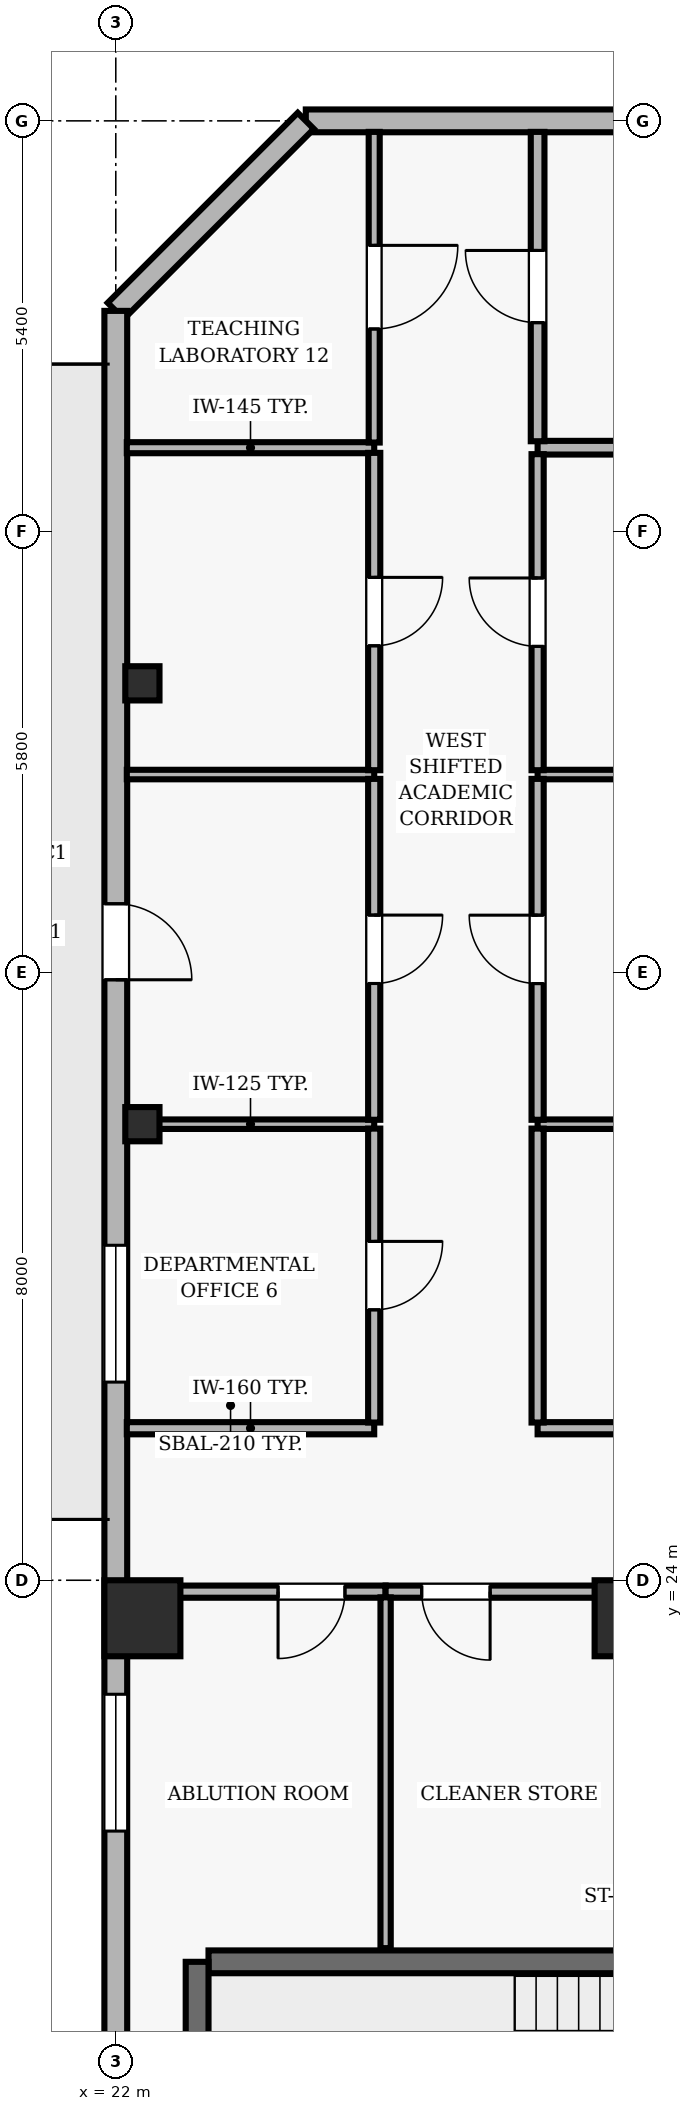
"""IFC4 building model, lengths in metres.
Left out: names, types, materials, properties, quantities, classifications, styles, units other than length and angle.
Written with IfcOpenShell. Run it as: python <this file> out.ifc"""

import sys

from ifc_helpers import new_model, si_unit, direction, frame, frame_2d, origin, origin_2d, place, context, subcontext, project, spatial, rectangle, hollow_rectangle, extrude, element, fill, save


model = new_model("IFC4")
c1 = context("Model", 3, precision=1e-05, world=origin(), true_north=direction((0.0, 1.0)))
c2 = subcontext(c1, "Body", "Model", "MODEL_VIEW")
j1 = project(units=[si_unit("LENGTHUNIT", "METRE"), si_unit("PLANEANGLEUNIT", "RADIAN")], contexts=[c1])
p1 = place(None, origin())
s1 = spatial("IfcSite", under=j1, at=p1, CompositionType="ELEMENT")
p2 = place(p1, origin())
s2 = spatial("IfcBuilding", under=s1, at=p2, CompositionType="ELEMENT")
p3 = place(p2, frame((0.0, 0.0, 187.5)))
s3 = spatial("IfcBuildingStorey", under=s2, at=p3, CompositionType="ELEMENT", Elevation=187.5)
for number, where, z_axis, x_axis in (
    (1, (22.35, 23.5, 0.0), (0.0, 0.0, 1.0), (1.0, 0.0, 0.0)),
    (2, (28.8, 23.5, 0.0), (0.0, 0.0, 1.0), (1.0, 0.0, 0.0)),
):
    element("IfcColumn", number, at=place(p3, frame(where, z_axis=z_axis, x_axis=x_axis)), inside=s3, PredefinedType="COLUMN", context=c2, shape_type="SweptSolid", body=[
        extrude(rectangle(XDim=1.0, YDim=1.0, at=origin_2d()), origin(), (0.0, 0.0, 1.0), 3.9),
    ])
for number, where, z_axis, x_axis in (
    (3, (22.35, 30.0, 0.0), (0.0, 0.0, 1.0), (1.0, 0.0, 0.0)),
    (4, (22.35, 35.8, 0.0), (0.0, 0.0, 1.0), (1.0, 0.0, 0.0)),
):
    element("IfcColumn", number, at=place(p3, frame(where, z_axis=z_axis, x_axis=x_axis)), inside=s3, PredefinedType="COLUMN", context=c2, shape_type="SweptSolid", body=[
        extrude(hollow_rectangle(XDim=0.45, YDim=0.45, WallThickness=0.02, at=origin_2d()), origin(), (0.0, 0.0, 1.0), 3.9),
    ])
p4 = place(p3, frame((35.5, 43.2, 0.0), z_axis=(0.0, 0.0, 1.0), x_axis=(-1.0, 0.0, 0.0)))
e5 = element("IfcWall", 5, at=p4, inside=s3, PredefinedType="SOLIDWALL", context=c2, shape_type="SweptSolid", body=[
    extrude(rectangle(XDim=11.0, YDim=0.3, at=frame_2d((5.5, 0.0))), origin(), (0.0, 0.0, 1.0), 3.69),
])
p5 = place(p4, frame((1.55, 0.0, 0.9)))
e6 = element("IfcOpeningElement", 6, at=p5, cuts=e5, PredefinedType="OPENING", context=c2, shape_type="SweptSolid", body=[
    extrude(rectangle(XDim=2.4, YDim=1.8, at=frame_2d((1.2, 0.9))), frame((0.0, 0.16, 0.0), z_axis=(0.0, -1.0, 0.0), x_axis=(1.0, 0.0, 0.0)), (0.0, 0.0, 1.0), 0.32),
])
p6 = place(p3, frame((24.5, 43.2, 0.0), z_axis=(0.0, 0.0, 1.0), x_axis=(-0.707106781187, -0.707106781187, 0.0)))
e7 = element("IfcWall", 7, at=p6, inside=s3, PredefinedType="SOLIDWALL", context=c2, shape_type="SweptSolid", body=[
    extrude(rectangle(XDim=3.536, YDim=0.3, at=frame_2d((1.768, 0.0))), origin(), (0.0, 0.0, 1.0), 3.69),
])
p7 = place(p3, frame((22.0, 40.7, 0.0), z_axis=(0.0, 0.0, 1.0), x_axis=(0.0, -1.0, 0.0)))
e8 = element("IfcWall", 8, at=p7, inside=s3, PredefinedType="SOLIDWALL", context=c2, shape_type="SweptSolid", body=[
    extrude(rectangle(XDim=38.2, YDim=0.3, at=frame_2d((19.1, 0.0))), origin(), (0.0, 0.0, 1.0), 3.69),
])
p8 = place(p7, frame((7.8, 0.0, 0.0)))
e9 = element("IfcOpeningElement", 9, at=p8, cuts=e8, PredefinedType="OPENING", context=c2, shape_type="SweptSolid", body=[
    extrude(rectangle(XDim=1.0, YDim=2.2, at=frame_2d((0.5, 1.1))), frame((0.0, 0.16, 0.0), z_axis=(0.0, -1.0, 0.0), x_axis=(1.0, 0.0, 0.0)), (0.0, 0.0, 1.0), 0.32),
])
p9 = place(p7, frame((12.293, 0.0, 0.9)))
e10 = element("IfcOpeningElement", 10, at=p9, cuts=e8, PredefinedType="OPENING", context=c2, shape_type="SweptSolid", body=[
    extrude(rectangle(XDim=1.8, YDim=2.2, at=frame_2d((0.9, 1.1))), frame((0.0, 0.16, 0.0), z_axis=(0.0, -1.0, 0.0), x_axis=(1.0, 0.0, 0.0)), (0.0, 0.0, 1.0), 0.32),
])
p10 = place(p7, frame((18.2, 0.0, 0.9)))
e11 = element("IfcOpeningElement", 11, at=p10, cuts=e8, PredefinedType="OPENING", context=c2, shape_type="SweptSolid", body=[
    extrude(rectangle(XDim=1.8, YDim=2.2, at=frame_2d((0.9, 1.1))), frame((0.0, 0.16, 0.0), z_axis=(0.0, -1.0, 0.0), x_axis=(1.0, 0.0, 0.0)), (0.0, 0.0, 1.0), 0.32),
])
p11 = place(p7, frame((23.207, 0.0, 0.9)))
e12 = element("IfcOpeningElement", 12, at=p11, cuts=e8, PredefinedType="OPENING", context=c2, shape_type="SweptSolid", body=[
    extrude(rectangle(XDim=1.8, YDim=2.2, at=frame_2d((0.9, 1.1))), frame((0.0, 0.16, 0.0), z_axis=(0.0, -1.0, 0.0), x_axis=(1.0, 0.0, 0.0)), (0.0, 0.0, 1.0), 0.32),
])
p12 = place(p7, frame((29.114, 0.0, 0.9)))
e13 = element("IfcOpeningElement", 13, at=p12, cuts=e8, PredefinedType="OPENING", context=c2, shape_type="SweptSolid", body=[
    extrude(rectangle(XDim=1.8, YDim=2.2, at=frame_2d((0.9, 1.1))), frame((0.0, 0.16, 0.0), z_axis=(0.0, -1.0, 0.0), x_axis=(1.0, 0.0, 0.0)), (0.0, 0.0, 1.0), 0.32),
])
p13 = place(p3, frame((31.58, 18.98, 0.0), z_axis=(0.0, 0.0, 1.0), x_axis=(-1.0, 0.0, 0.0)))
e14 = element("IfcWall", 14, at=p13, inside=s3, PredefinedType="SHEAR", context=c2, shape_type="SweptSolid", body=[
    extrude(rectangle(XDim=8.36, YDim=0.3, at=frame_2d((4.18, 0.0))), origin(), (0.0, 0.0, 1.0), 3.69),
])
p14 = place(p3, frame((23.07, 18.98, 0.0), z_axis=(0.0, 0.0, 1.0), x_axis=(0.0, -1.0, 0.0)))
e15 = element("IfcWall", 15, at=p14, inside=s3, PredefinedType="SHEAR", context=c2, shape_type="SweptSolid", body=[
    extrude(rectangle(XDim=3.51, YDim=0.3, at=frame_2d((1.755, 0.0))), origin(), (0.0, 0.0, 1.0), 3.69),
])
p15 = place(p3, frame((25.4, 26.0, 0.0), z_axis=(0.0, 0.0, 1.0), x_axis=(-1.0, 0.0, 0.0)))
e16 = element("IfcWall", 16, at=p15, inside=s3, PredefinedType="PARTITIONING", context=c2, shape_type="SweptSolid", body=[
    extrude(rectangle(XDim=3.255, YDim=0.16, at=frame_2d((1.627, 0.0))), origin(), (0.0, 0.0, 1.0), 3.69),
])
p16 = place(p3, frame((25.4, 30.0, 0.0), z_axis=(0.0, 0.0, 1.0), x_axis=(-1.0, 0.0, 0.0)))
e17 = element("IfcWall", 17, at=p16, inside=s3, PredefinedType="PARTITIONING", context=c2, shape_type="SweptSolid", body=[
    extrude(rectangle(XDim=3.255, YDim=0.125, at=frame_2d((1.627, 0.0))), origin(), (0.0, 0.0, 1.0), 3.146),
])
p17 = place(p3, frame((25.4, 34.6, 0.0), z_axis=(0.0, 0.0, 1.0), x_axis=(-1.0, 0.0, 0.0)))
e18 = element("IfcWall", 18, at=p17, inside=s3, PredefinedType="PARTITIONING", context=c2, shape_type="SweptSolid", body=[
    extrude(rectangle(XDim=3.255, YDim=0.125, at=frame_2d((1.627, 0.0))), origin(), (0.0, 0.0, 1.0), 3.69),
])
p18 = place(p3, frame((25.4, 38.9, 0.0), z_axis=(0.0, 0.0, 1.0), x_axis=(-1.0, 0.0, 0.0)))
e19 = element("IfcWall", 19, at=p18, inside=s3, PredefinedType="PARTITIONING", context=c2, shape_type="SweptSolid", body=[
    extrude(rectangle(XDim=3.255, YDim=0.145, at=frame_2d((1.627, 0.0))), origin(), (0.0, 0.0, 1.0), 3.69),
])
p19 = place(p3, frame((25.55, 23.85, 0.0), z_axis=(0.0, 0.0, 1.0), x_axis=(-1.0, 0.0, 0.0)))
e20 = element("IfcWall", 20, at=p19, inside=s3, PredefinedType="PARTITIONING", context=c2, shape_type="SweptSolid", body=[
    extrude(rectangle(XDim=3.35, YDim=0.16, at=frame_2d((1.675, 0.0))), origin(), (0.0, 0.0, 1.0), 3.146),
])
p20 = place(p19, frame((0.535, 0.0, 0.0)))
e21 = element("IfcOpeningElement", 21, at=p20, cuts=e20, PredefinedType="OPENING", context=c2, shape_type="SweptSolid", body=[
    extrude(rectangle(XDim=0.88, YDim=2.1, at=frame_2d((0.44, 1.05))), frame((0.0, 0.09, 0.0), z_axis=(0.0, -1.0, 0.0), x_axis=(1.0, 0.0, 0.0)), (0.0, 0.0, 1.0), 0.18),
])
p21 = place(p3, frame((28.8, 23.85, 0.0), z_axis=(0.0, 0.0, 1.0), x_axis=(-1.0, 0.0, 0.0)))
e22 = element("IfcWall", 22, at=p21, inside=s3, PredefinedType="PARTITIONING", context=c2, shape_type="SweptSolid", body=[
    extrude(rectangle(XDim=3.25, YDim=0.16, at=frame_2d((1.625, 0.0))), origin(), (0.0, 0.0, 1.0), 3.146),
])
p22 = place(p21, frame((1.875, 0.0, 0.0)))
e23 = element("IfcOpeningElement", 23, at=p22, cuts=e22, PredefinedType="OPENING", context=c2, shape_type="SweptSolid", body=[
    extrude(rectangle(XDim=0.9, YDim=2.1, at=frame_2d((0.45, 1.05))), frame((0.0, 0.09, 0.0), z_axis=(0.0, -1.0, 0.0), x_axis=(1.0, 0.0, 0.0)), (0.0, 0.0, 1.0), 0.18),
])
p23 = place(p3, frame((37.85, 26.0, 0.0), z_axis=(0.0, 0.0, 1.0), x_axis=(-1.0, 0.0, 0.0)))
e24 = element("IfcWall", 24, at=p23, inside=s3, PredefinedType="PARTITIONING", context=c2, shape_type="SweptSolid", body=[
    extrude(rectangle(XDim=10.3, YDim=0.16, at=frame_2d((5.15, 0.0))), origin(), (0.0, 0.0, 1.0), 3.69),
])
p24 = place(p23, frame((4.7, 0.0, 0.0)))
e25 = element("IfcOpeningElement", 25, at=p24, cuts=e24, PredefinedType="OPENING", context=c2, shape_type="SweptSolid", body=[
    extrude(rectangle(XDim=0.9, YDim=2.1, at=frame_2d((0.45, 1.05))), frame((0.0, 0.09, 0.0), z_axis=(0.0, -1.0, 0.0), x_axis=(1.0, 0.0, 0.0)), (0.0, 0.0, 1.0), 0.18),
])
p25 = place(p3, frame((37.85, 30.0, 0.0), z_axis=(0.0, 0.0, 1.0), x_axis=(-1.0, 0.0, 0.0)))
e26 = element("IfcWall", 26, at=p25, inside=s3, PredefinedType="PARTITIONING", context=c2, shape_type="SweptSolid", body=[
    extrude(rectangle(XDim=10.3, YDim=0.125, at=frame_2d((5.15, 0.0))), origin(), (0.0, 0.0, 1.0), 3.146),
])
p26 = place(p3, frame((37.85, 34.6, 0.0), z_axis=(0.0, 0.0, 1.0), x_axis=(-1.0, 0.0, 0.0)))
e27 = element("IfcWall", 27, at=p26, inside=s3, PredefinedType="PARTITIONING", context=c2, shape_type="SweptSolid", body=[
    extrude(rectangle(XDim=10.3, YDim=0.125, at=frame_2d((5.15, 0.0))), origin(), (0.0, 0.0, 1.0), 3.69),
])
p27 = place(p3, frame((37.85, 38.9, 0.0), z_axis=(0.0, 0.0, 1.0), x_axis=(-1.0, 0.0, 0.0)))
e28 = element("IfcWall", 28, at=p27, inside=s3, PredefinedType="PARTITIONING", context=c2, shape_type="SweptSolid", body=[
    extrude(rectangle(XDim=10.3, YDim=0.18, at=frame_2d((5.15, 0.0))), origin(), (0.0, 0.0, 1.0), 3.69),
])
p28 = place(p3, frame((25.4, 29.942, 0.0), z_axis=(0.0, 0.0, 1.0), x_axis=(0.0, -1.0, 0.0)))
e29 = element("IfcWall", 29, at=p28, inside=s3, PredefinedType="PARTITIONING", context=c2, shape_type="SweptSolid", body=[
    extrude(rectangle(XDim=3.867, YDim=0.16, at=frame_2d((1.934, 0.0))), origin(), (0.0, 0.0, 1.0), 3.69),
])
p29 = place(p28, frame((1.484, 0.0, 0.0)))
e30 = element("IfcOpeningElement", 30, at=p29, cuts=e29, PredefinedType="OPENING", context=c2, shape_type="SweptSolid", body=[
    extrude(rectangle(XDim=0.9, YDim=2.1, at=frame_2d((0.45, 1.05))), frame((0.0, 0.09, 0.0), z_axis=(0.0, -1.0, 0.0), x_axis=(1.0, 0.0, 0.0)), (0.0, 0.0, 1.0), 0.18),
])
p30 = place(p3, frame((25.4, 34.543, 0.0), z_axis=(0.0, 0.0, 1.0), x_axis=(0.0, -1.0, 0.0)))
e31 = element("IfcWall", 31, at=p30, inside=s3, PredefinedType="PARTITIONING", context=c2, shape_type="SweptSolid", body=[
    extrude(rectangle(XDim=4.485, YDim=0.16, at=frame_2d((2.242, 0.0))), origin(), (0.0, 0.0, 1.0), 3.69),
])
p31 = place(p30, frame((1.792, 0.0, 0.0)))
e32 = element("IfcOpeningElement", 32, at=p31, cuts=e31, PredefinedType="OPENING", context=c2, shape_type="SweptSolid", body=[
    extrude(rectangle(XDim=0.9, YDim=2.1, at=frame_2d((0.45, 1.05))), frame((0.0, 0.09, 0.0), z_axis=(0.0, -1.0, 0.0), x_axis=(1.0, 0.0, 0.0)), (0.0, 0.0, 1.0), 0.18),
])
p32 = place(p3, frame((25.4, 38.832, 0.0), z_axis=(0.0, 0.0, 1.0), x_axis=(0.0, -1.0, 0.0)))
e33 = element("IfcWall", 33, at=p32, inside=s3, PredefinedType="PARTITIONING", context=c2, shape_type="SweptSolid", body=[
    extrude(rectangle(XDim=4.175, YDim=0.16, at=frame_2d((2.087, 0.0))), origin(), (0.0, 0.0, 1.0), 3.69),
])
p33 = place(p32, frame((1.638, 0.0, 0.0)))
e34 = element("IfcOpeningElement", 34, at=p33, cuts=e33, PredefinedType="OPENING", context=c2, shape_type="SweptSolid", body=[
    extrude(rectangle(XDim=0.9, YDim=2.1, at=frame_2d((0.45, 1.05))), frame((0.0, 0.09, 0.0), z_axis=(0.0, -1.0, 0.0), x_axis=(1.0, 0.0, 0.0)), (0.0, 0.0, 1.0), 0.18),
])
p34 = place(p3, frame((25.4, 43.055, 0.0), z_axis=(0.0, 0.0, 1.0), x_axis=(0.0, -1.0, 0.0)))
e35 = element("IfcWall", 35, at=p34, inside=s3, PredefinedType="PARTITIONING", context=c2, shape_type="SweptSolid", body=[
    extrude(rectangle(XDim=4.087, YDim=0.145, at=frame_2d((2.043, 0.0))), origin(), (0.0, 0.0, 1.0), 3.69),
])
p35 = place(p34, frame((1.493, 0.0, 0.0)))
e36 = element("IfcOpeningElement", 36, at=p35, cuts=e35, PredefinedType="OPENING", context=c2, shape_type="SweptSolid", body=[
    extrude(rectangle(XDim=1.1, YDim=2.15, at=frame_2d((0.55, 1.075))), frame((0.0, 0.083, 0.0), z_axis=(0.0, -1.0, 0.0), x_axis=(1.0, 0.0, 0.0)), (0.0, 0.0, 1.0), 0.165),
])
p36 = place(p3, frame((25.55, 19.16, 0.0), z_axis=(0.0, 0.0, 1.0), x_axis=(0.0, 1.0, 0.0)))
e37 = element("IfcWall", 37, at=p36, inside=s3, PredefinedType="PARTITIONING", context=c2, shape_type="SweptSolid", body=[
    extrude(rectangle(XDim=4.615, YDim=0.135, at=frame_2d((2.308, 0.0))), origin(), (0.0, 0.0, 1.0), 3.69),
])
p37 = place(p3, frame((27.55, 26.075, 0.0), z_axis=(0.0, 0.0, 1.0), x_axis=(0.0, 1.0, 0.0)))
e38 = element("IfcWall", 38, at=p37, inside=s3, PredefinedType="PARTITIONING", context=c2, shape_type="SweptSolid", body=[
    extrude(rectangle(XDim=3.867, YDim=0.16, at=frame_2d((1.934, 0.0))), origin(), (0.0, 0.0, 1.0), 3.69),
])
p38 = place(p3, frame((27.55, 30.058, 0.0), z_axis=(0.0, 0.0, 1.0), x_axis=(0.0, 1.0, 0.0)))
e39 = element("IfcWall", 39, at=p38, inside=s3, PredefinedType="PARTITIONING", context=c2, shape_type="SweptSolid", body=[
    extrude(rectangle(XDim=4.485, YDim=0.16, at=frame_2d((2.242, 0.0))), origin(), (0.0, 0.0, 1.0), 3.69),
])
p39 = place(p38, frame((1.792, 0.0, 0.0)))
e40 = element("IfcOpeningElement", 40, at=p39, cuts=e39, PredefinedType="OPENING", context=c2, shape_type="SweptSolid", body=[
    extrude(rectangle(XDim=0.9, YDim=2.1, at=frame_2d((0.45, 1.05))), frame((0.0, 0.09, 0.0), z_axis=(0.0, -1.0, 0.0), x_axis=(1.0, 0.0, 0.0)), (0.0, 0.0, 1.0), 0.18),
])
p40 = place(p3, frame((27.55, 34.657, 0.0), z_axis=(0.0, 0.0, 1.0), x_axis=(0.0, 1.0, 0.0)))
e41 = element("IfcWall", 41, at=p40, inside=s3, PredefinedType="PARTITIONING", context=c2, shape_type="SweptSolid", body=[
    extrude(rectangle(XDim=4.158, YDim=0.16, at=frame_2d((2.079, 0.0))), origin(), (0.0, 0.0, 1.0), 3.69),
])
p41 = place(p40, frame((1.629, 0.0, 0.0)))
e42 = element("IfcOpeningElement", 42, at=p41, cuts=e41, PredefinedType="OPENING", context=c2, shape_type="SweptSolid", body=[
    extrude(rectangle(XDim=0.9, YDim=2.1, at=frame_2d((0.45, 1.05))), frame((0.0, 0.09, 0.0), z_axis=(0.0, -1.0, 0.0), x_axis=(1.0, 0.0, 0.0)), (0.0, 0.0, 1.0), 0.18),
])
p42 = place(p3, frame((27.55, 38.985, 0.0), z_axis=(0.0, 0.0, 1.0), x_axis=(0.0, 1.0, 0.0)))
e43 = element("IfcWall", 43, at=p42, inside=s3, PredefinedType="PARTITIONING", context=c2, shape_type="SweptSolid", body=[
    extrude(rectangle(XDim=4.07, YDim=0.18, at=frame_2d((2.035, 0.0))), origin(), (0.0, 0.0, 1.0), 3.69),
])
p43 = place(p42, frame((1.56, 0.0, 0.0)))
e44 = element("IfcOpeningElement", 44, at=p43, cuts=e43, PredefinedType="OPENING", context=c2, shape_type="SweptSolid", body=[
    extrude(rectangle(XDim=0.95, YDim=2.1, at=frame_2d((0.475, 1.05))), frame((0.0, 0.1, 0.0), z_axis=(0.0, -1.0, 0.0), x_axis=(1.0, 0.0, 0.0)), (0.0, 0.0, 1.0), 0.2),
])
p44 = place(p8, origin())
e45 = element("IfcDoor", 45, at=p44, inside=s3, OperationType="SINGLE_SWING_RIGHT", PredefinedType="DOOR", context=c2, shape_type="SweptSolid", body=[
    extrude(rectangle(XDim=1.0, YDim=2.2, at=frame_2d((0.5, 1.1))), frame((0.0, 0.025, 0.0), z_axis=(0.0, -1.0, 0.0), x_axis=(1.0, 0.0, 0.0)), (0.0, 0.0, 1.0), 0.05),
])
fill(e9, e45)
p45 = place(p9, origin())
e46 = element("IfcWindow", 46, at=p45, inside=s3, PartitioningType="SINGLE_PANEL", PredefinedType="WINDOW", context=c2, shape_type="SweptSolid", body=[
    extrude(rectangle(XDim=1.8, YDim=2.2, at=frame_2d((0.9, 1.1))), frame((0.0, 0.03, 0.0), z_axis=(0.0, -1.0, 0.0), x_axis=(1.0, 0.0, 0.0)), (0.0, 0.0, 1.0), 0.06),
])
fill(e10, e46)
p46 = place(p10, origin())
e47 = element("IfcWindow", 47, at=p46, inside=s3, PartitioningType="SINGLE_PANEL", PredefinedType="WINDOW", context=c2, shape_type="SweptSolid", body=[
    extrude(rectangle(XDim=1.8, YDim=2.2, at=frame_2d((0.9, 1.1))), frame((0.0, 0.03, 0.0), z_axis=(0.0, -1.0, 0.0), x_axis=(1.0, 0.0, 0.0)), (0.0, 0.0, 1.0), 0.06),
])
fill(e11, e47)
p47 = place(p20, origin())
e48 = element("IfcDoor", 48, at=p47, inside=s3, OperationType="SINGLE_SWING_RIGHT", PredefinedType="DOOR", context=c2, shape_type="SweptSolid", body=[
    extrude(rectangle(XDim=0.88, YDim=2.1, at=frame_2d((0.44, 1.05))), frame((0.0, 0.025, 0.0), z_axis=(0.0, -1.0, 0.0), x_axis=(1.0, 0.0, 0.0)), (0.0, 0.0, 1.0), 0.05),
])
fill(e21, e48)
p48 = place(p22, origin())
e49 = element("IfcDoor", 49, at=p48, inside=s3, OperationType="SINGLE_SWING_LEFT", PredefinedType="DOOR", context=c2, shape_type="SweptSolid", body=[
    extrude(rectangle(XDim=0.9, YDim=2.1, at=frame_2d((0.45, 1.05))), frame((0.0, 0.025, 0.0), z_axis=(0.0, -1.0, 0.0), x_axis=(1.0, 0.0, 0.0)), (0.0, 0.0, 1.0), 0.05),
])
fill(e23, e49)
p49 = place(p29, origin())
e50 = element("IfcDoor", 50, at=p49, inside=s3, OperationType="SINGLE_SWING_LEFT", PredefinedType="DOOR", context=c2, shape_type="SweptSolid", body=[
    extrude(rectangle(XDim=0.9, YDim=2.1, at=frame_2d((0.45, 1.05))), frame((0.0, 0.025, 0.0), z_axis=(0.0, -1.0, 0.0), x_axis=(1.0, 0.0, 0.0)), (0.0, 0.0, 1.0), 0.05),
])
fill(e30, e50)
p50 = place(p31, origin())
e51 = element("IfcDoor", 51, at=p50, inside=s3, OperationType="SINGLE_SWING_LEFT", PredefinedType="DOOR", context=c2, shape_type="SweptSolid", body=[
    extrude(rectangle(XDim=0.9, YDim=2.1, at=frame_2d((0.45, 1.05))), frame((0.0, 0.025, 0.0), z_axis=(0.0, -1.0, 0.0), x_axis=(1.0, 0.0, 0.0)), (0.0, 0.0, 1.0), 0.05),
])
fill(e32, e51)
p51 = place(p39, origin())
e52 = element("IfcDoor", 52, at=p51, inside=s3, OperationType="SINGLE_SWING_RIGHT", PredefinedType="DOOR", context=c2, shape_type="SweptSolid", body=[
    extrude(rectangle(XDim=0.9, YDim=2.1, at=frame_2d((0.45, 1.05))), frame((0.0, 0.025, 0.0), z_axis=(0.0, -1.0, 0.0), x_axis=(1.0, 0.0, 0.0)), (0.0, 0.0, 1.0), 0.05),
])
fill(e40, e52)
p52 = place(p33, origin())
e53 = element("IfcDoor", 53, at=p52, inside=s3, OperationType="SINGLE_SWING_LEFT", PredefinedType="DOOR", context=c2, shape_type="SweptSolid", body=[
    extrude(rectangle(XDim=0.9, YDim=2.1, at=frame_2d((0.45, 1.05))), frame((0.0, 0.025, 0.0), z_axis=(0.0, -1.0, 0.0), x_axis=(1.0, 0.0, 0.0)), (0.0, 0.0, 1.0), 0.05),
])
fill(e34, e53)
p53 = place(p41, origin())
e54 = element("IfcDoor", 54, at=p53, inside=s3, OperationType="SINGLE_SWING_RIGHT", PredefinedType="DOOR", context=c2, shape_type="SweptSolid", body=[
    extrude(rectangle(XDim=0.9, YDim=2.1, at=frame_2d((0.45, 1.05))), frame((0.0, 0.025, 0.0), z_axis=(0.0, -1.0, 0.0), x_axis=(1.0, 0.0, 0.0)), (0.0, 0.0, 1.0), 0.05),
])
fill(e42, e54)
p54 = place(p35, origin())
e55 = element("IfcDoor", 55, at=p54, inside=s3, OperationType="SINGLE_SWING_LEFT", PredefinedType="DOOR", context=c2, shape_type="SweptSolid", body=[
    extrude(rectangle(XDim=1.1, YDim=2.15, at=frame_2d((0.55, 1.075))), frame((0.0, 0.025, 0.0), z_axis=(0.0, -1.0, 0.0), x_axis=(1.0, 0.0, 0.0)), (0.0, 0.0, 1.0), 0.05),
])
fill(e36, e55)
p55 = place(p43, origin())
e56 = element("IfcDoor", 56, at=p55, inside=s3, OperationType="SINGLE_SWING_RIGHT", PredefinedType="DOOR", context=c2, shape_type="SweptSolid", body=[
    extrude(rectangle(XDim=0.95, YDim=2.1, at=frame_2d((0.475, 1.05))), frame((0.0, 0.025, 0.0), z_axis=(0.0, -1.0, 0.0), x_axis=(1.0, 0.0, 0.0)), (0.0, 0.0, 1.0), 0.05),
])
fill(e44, e56)
save(model, sys.argv[1])
